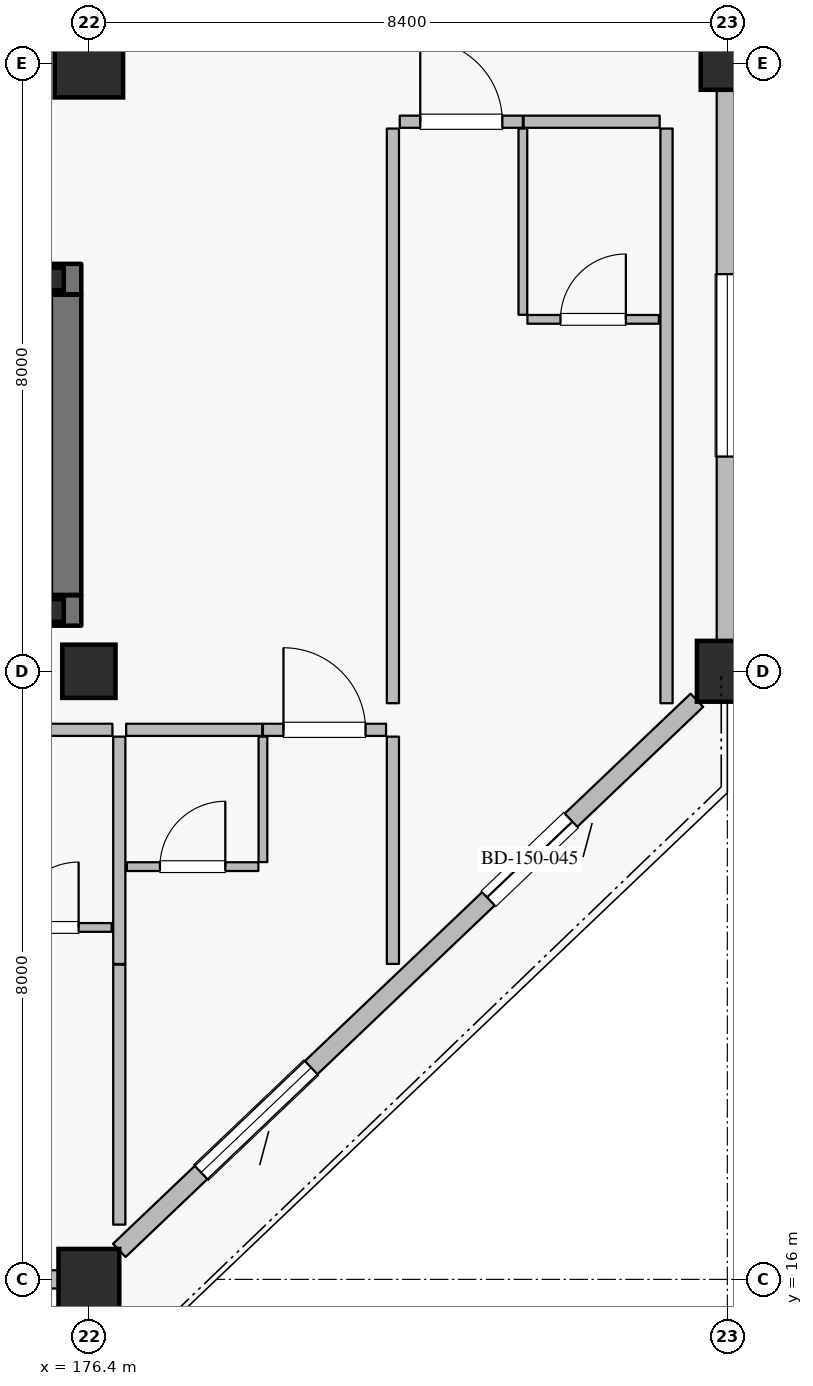
"""IFC4 building model, lengths in metres.
Left out: names, types, materials, properties, quantities, classifications, styles, units other than length and angle.
Written with IfcOpenShell. Run it as: python <this file> out.ifc"""

import sys

from ifc_helpers import new_model, si_unit, direction, frame, frame_2d, origin, origin_2d, place, context, subcontext, project, spatial, rectangle, hollow_rectangle, extrude, element, fill, save


model = new_model("IFC4")
c1 = context("Model", 3, precision=1e-05, world=origin(), true_north=direction((0.0, 1.0)))
c2 = subcontext(c1, "Body", "Model", "MODEL_VIEW")
j1 = project(units=[si_unit("LENGTHUNIT", "METRE"), si_unit("PLANEANGLEUNIT", "RADIAN")], contexts=[c1])
p1 = place(None, origin())
s1 = spatial("IfcSite", under=j1, at=p1, CompositionType="ELEMENT")
p2 = place(p1, origin())
s2 = spatial("IfcBuilding", under=s1, at=p2, CompositionType="ELEMENT")
p3 = place(p2, frame((0.0, 0.0, 25.2)))
s3 = spatial("IfcBuildingStorey", under=s2, at=p3, CompositionType="ELEMENT", Elevation=25.2)
p4 = place(p3, frame((176.4, 16.0, 0.0), z_axis=(0.0, 0.0, 1.0), x_axis=(1.0, 0.0, 0.0)))
e1 = element("IfcColumn", 1, at=p4, inside=s3, PredefinedType="COLUMN", context=c2, shape_type="SweptSolid", body=[
    extrude(rectangle(XDim=0.8, YDim=0.8, at=origin_2d()), origin(), (0.0, 0.0, 1.0), 3.6),
])
p5 = place(p3, frame((176.4, 32.0, 0.0), z_axis=(0.0, 0.0, 1.0), x_axis=(1.0, 0.0, 0.0)))
e2 = element("IfcColumn", 2, at=p5, inside=s3, PredefinedType="COLUMN", context=c2, shape_type="SweptSolid", body=[
    extrude(rectangle(XDim=0.9, YDim=0.9, at=origin_2d()), origin(), (0.0, 0.0, 1.0), 3.6),
])
p6 = place(p3, frame((184.8, 24.0, 0.0), z_axis=(0.0, 0.0, 1.0), x_axis=(1.0, 0.0, 0.0)))
e3 = element("IfcColumn", 3, at=p6, inside=s3, PredefinedType="COLUMN", context=c2, shape_type="SweptSolid", body=[
    extrude(rectangle(XDim=0.8, YDim=0.8, at=origin_2d()), origin(), (0.0, 0.0, 1.0), 3.6),
])
for number, where, z_axis, x_axis in (
    (4, (176.4, 24.0, 0.0), (0.0, 0.0, 1.0), (1.0, 0.0, 0.0)),
    (5, (184.8, 32.0, 0.0), (0.0, 0.0, 1.0), (1.0, 0.0, 0.0)),
):
    element("IfcColumn", number, at=place(p3, frame(where, z_axis=z_axis, x_axis=x_axis)), inside=s3, PredefinedType="COLUMN", context=c2, shape_type="SweptSolid", body=[
        extrude(rectangle(XDim=0.7, YDim=0.7, at=origin_2d()), origin(), (0.0, 0.0, 1.0), 3.6),
    ])
p7 = place(p3, frame((176.0, 16.0, 0.0), z_axis=(0.0, 0.0, 1.0), x_axis=(-1.0, 0.0, 0.0)))
e6 = element("IfcWall", 6, at=p7, inside=s3, PredefinedType="SOLIDWALL", context=c2, shape_type="SweptSolid", body=[
    extrude(rectangle(XDim=7.6, YDim=0.24, at=frame_2d((3.8, 0.0))), origin(), (0.0, 0.0, 1.0), 2.89),
])
p8 = place(p7, frame((0.6, 0.0, 0.0)))
e7 = element("IfcOpeningElement", 7, at=p8, cuts=e6, PredefinedType="OPENING", context=c2, shape_type="SweptSolid", body=[
    extrude(rectangle(XDim=1.5, YDim=2.25, at=frame_2d((0.75, 1.125))), frame((0.0, 0.13, 0.0), z_axis=(0.0, -1.0, 0.0), x_axis=(1.0, 0.0, 0.0)), (0.0, 0.0, 1.0), 0.26),
])
p9 = place(p7, frame((3.6, 0.0, 0.8)))
e8 = element("IfcOpeningElement", 8, at=p9, cuts=e6, PredefinedType="OPENING", context=c2, shape_type="SweptSolid", body=[
    extrude(rectangle(XDim=2.0, YDim=1.75, at=frame_2d((1.0, 0.875))), frame((0.0, 0.13, 0.0), z_axis=(0.0, -1.0, 0.0), x_axis=(1.0, 0.0, 0.0)), (0.0, 0.0, 1.0), 0.26),
])
p10 = place(p3, frame((184.4, 23.619, 0.0), z_axis=(0.0, 0.0, 1.0), x_axis=(-0.724145676014, -0.689647040094, 0.0)))
e9 = element("IfcWall", 9, at=p10, inside=s3, PredefinedType="SOLIDWALL", context=c2, shape_type="SweptSolid", body=[
    extrude(rectangle(XDim=10.495, YDim=0.24, at=frame_2d((5.248, 0.0))), origin(), (0.0, 0.0, 1.0), 2.89),
])
p11 = place(p10, frame((2.288, 0.0, 0.0)))
e10 = element("IfcOpeningElement", 10, at=p11, cuts=e9, PredefinedType="OPENING", context=c2, shape_type="SweptSolid", body=[
    extrude(rectangle(XDim=1.5, YDim=2.25, at=frame_2d((0.75, 1.125))), frame((0.0, 0.13, 0.0), z_axis=(0.0, -1.0, 0.0), x_axis=(1.0, 0.0, 0.0)), (0.0, 0.0, 1.0), 0.26),
])
p12 = place(p10, frame((7.009, 0.0, 0.8)))
e11 = element("IfcOpeningElement", 11, at=p12, cuts=e9, PredefinedType="OPENING", context=c2, shape_type="SweptSolid", body=[
    extrude(rectangle(XDim=2.0, YDim=1.75, at=frame_2d((1.0, 0.875))), frame((0.0, 0.13, 0.0), z_axis=(0.0, -1.0, 0.0), x_axis=(1.0, 0.0, 0.0)), (0.0, 0.0, 1.0), 0.26),
])
p13 = place(p3, frame((184.8, 31.65, 0.0), z_axis=(0.0, 0.0, 1.0), x_axis=(0.0, -1.0, 0.0)))
e12 = element("IfcWall", 12, at=p13, inside=s3, PredefinedType="SOLIDWALL", context=c2, shape_type="SweptSolid", body=[
    extrude(rectangle(XDim=7.25, YDim=0.28, at=frame_2d((3.625, 0.0))), origin(), (0.0, 0.0, 1.0), 2.7),
])
p14 = place(p13, frame((2.425, 0.0, 0.5)))
e13 = element("IfcOpeningElement", 13, at=p14, cuts=e12, PredefinedType="OPENING", context=c2, shape_type="SweptSolid", body=[
    extrude(rectangle(XDim=2.4, YDim=1.65, at=frame_2d((1.2, 0.825))), frame((0.0, 0.15, 0.0), z_axis=(0.0, -1.0, 0.0), x_axis=(1.0, 0.0, 0.0)), (0.0, 0.0, 1.0), 0.3),
])
p15 = place(p3, frame((168.1, 24.8, 0.0), z_axis=(0.0, 0.0, 1.0), x_axis=(1.0, 0.0, 0.0)))
e14 = element("IfcWall", 14, at=p15, inside=s3, PredefinedType="SHEAR", context=c2, shape_type="SweptSolid", body=[
    extrude(rectangle(XDim=8.2, YDim=0.4, at=frame_2d((4.1, 0.0))), origin(), (0.0, 0.0, 1.0), 3.335),
])
p16 = place(p3, frame((176.1, 25.005, 0.0), z_axis=(0.0, 0.0, 1.0), x_axis=(0.0, 1.0, 0.0)))
e15 = element("IfcWall", 15, at=p16, inside=s3, PredefinedType="SHEAR", context=c2, shape_type="SweptSolid", body=[
    extrude(rectangle(XDim=3.95, YDim=0.4, at=frame_2d((1.975, 0.0))), origin(), (0.0, 0.0, 1.0), 3.335),
])
p17 = place(p3, frame((168.1, 29.16, 0.0), z_axis=(0.0, 0.0, 1.0), x_axis=(1.0, 0.0, 0.0)))
e16 = element("IfcWall", 16, at=p17, inside=s3, PredefinedType="SHEAR", context=c2, shape_type="SweptSolid", body=[
    extrude(rectangle(XDim=8.2, YDim=0.4, at=frame_2d((4.1, 0.0))), origin(), (0.0, 0.0, 1.0), 3.335),
])
p18 = place(p17, frame((0.43, 0.0, 0.0)))
e17 = element("IfcOpeningElement", 17, at=p18, cuts=e16, PredefinedType="OPENING", context=c2, shape_type="SweptSolid", body=[
    extrude(rectangle(XDim=1.16, YDim=2.2, at=frame_2d((0.58, 1.1))), frame((0.0, 0.21, 0.0), z_axis=(0.0, -1.0, 0.0), x_axis=(1.0, 0.0, 0.0)), (0.0, 0.0, 1.0), 0.42),
])
for number, where, z_axis, x_axis in (
    (18, (175.92, 24.8, -2.1), (0.0, 0.0, 1.0), (1.0, 0.0, 0.0)),
    (19, (175.92, 29.16, -2.1), (0.0, 0.0, 1.0), (1.0, 0.0, 0.0)),
):
    element("IfcColumn", number, at=place(p3, frame(where, z_axis=z_axis, x_axis=x_axis)), inside=s3, PredefinedType="COLUMN", context=c2, shape_type="SweptSolid", body=[
        extrude(hollow_rectangle(XDim=0.3, YDim=0.3, WallThickness=0.012, at=origin_2d()), origin(), (0.0, 0.0, 1.0), 3.72),
    ])
p19 = place(p3, frame((174.92, 23.23, 0.0), z_axis=(0.0, 0.0, 1.0), x_axis=(1.0, 0.0, 0.0)))
e20 = element("IfcWall", 20, at=p19, inside=s3, PredefinedType="PARTITIONING", context=c2, shape_type="SweptSolid", body=[
    extrude(rectangle(XDim=1.79, YDim=0.16, at=frame_2d((0.895, 0.0))), origin(), (0.0, 0.0, 1.0), 3.335),
])
p20 = place(p3, frame((174.97, 20.63, 0.0), z_axis=(0.0, 0.0, 1.0), x_axis=(1.0, 0.0, 0.0)))
e21 = element("IfcWall", 21, at=p20, inside=s3, PredefinedType="PARTITIONING", context=c2, shape_type="SweptSolid", body=[
    extrude(rectangle(XDim=1.73, YDim=0.115, at=frame_2d((0.865, 0.0))), origin(), (0.0, 0.0, 1.0), 3.335),
])
p21 = place(p20, frame((0.435, 0.0, 0.0)))
e22 = element("IfcOpeningElement", 22, at=p21, cuts=e21, PredefinedType="OPENING", context=c2, shape_type="SweptSolid", body=[
    extrude(rectangle(XDim=0.86, YDim=2.12, at=frame_2d((0.43, 1.06))), frame((0.0, 0.067, 0.0), z_axis=(0.0, -1.0, 0.0), x_axis=(1.0, 0.0, 0.0)), (0.0, 0.0, 1.0), 0.135),
])
p22 = place(p3, frame((176.8, 16.72, 0.0), z_axis=(0.0, 0.0, 1.0), x_axis=(0.0, 1.0, 0.0)))
e23 = element("IfcWall", 23, at=p22, inside=s3, PredefinedType="PARTITIONING", context=c2, shape_type="SweptSolid", body=[
    extrude(rectangle(XDim=3.42, YDim=0.16, at=frame_2d((1.71, 0.0))), origin(), (0.0, 0.0, 1.0), 3.335),
])
p23 = place(p3, frame((176.89, 23.23, 0.0), z_axis=(0.0, 0.0, 1.0), x_axis=(1.0, 0.0, 0.0)))
e24 = element("IfcWall", 24, at=p23, inside=s3, PredefinedType="PARTITIONING", context=c2, shape_type="SweptSolid", body=[
    extrude(rectangle(XDim=1.79, YDim=0.16, at=frame_2d((0.895, 0.0))), origin(), (0.0, 0.0, 1.0), 3.335),
])
p24 = place(p3, frame((178.69, 23.23, 0.0), z_axis=(0.0, 0.0, 1.0), x_axis=(1.0, 0.0, 0.0)))
e25 = element("IfcWall", 25, at=p24, inside=s3, PredefinedType="PARTITIONING", context=c2, shape_type="SweptSolid", body=[
    extrude(rectangle(XDim=1.62, YDim=0.16, at=frame_2d((0.81, 0.0))), origin(), (0.0, 0.0, 1.0), 3.335),
])
p25 = place(p24, frame((0.27, 0.0, 0.0)))
e26 = element("IfcOpeningElement", 26, at=p25, cuts=e25, PredefinedType="OPENING", context=c2, shape_type="SweptSolid", body=[
    extrude(rectangle(XDim=1.08, YDim=2.3, at=frame_2d((0.54, 1.15))), frame((0.0, 0.09, 0.0), z_axis=(0.0, -1.0, 0.0), x_axis=(1.0, 0.0, 0.0)), (0.0, 0.0, 1.0), 0.18),
])
p26 = place(p3, frame((178.69, 21.49, 0.0), z_axis=(0.0, 0.0, 1.0), x_axis=(0.0, 1.0, 0.0)))
e27 = element("IfcWall", 27, at=p26, inside=s3, PredefinedType="PARTITIONING", context=c2, shape_type="SweptSolid", body=[
    extrude(rectangle(XDim=1.65, YDim=0.115, at=frame_2d((0.825, 0.0))), origin(), (0.0, 0.0, 1.0), 3.335),
])
p27 = place(p3, frame((176.9, 21.43, 0.0), z_axis=(0.0, 0.0, 1.0), x_axis=(1.0, 0.0, 0.0)))
e28 = element("IfcWall", 28, at=p27, inside=s3, PredefinedType="PARTITIONING", context=c2, shape_type="SweptSolid", body=[
    extrude(rectangle(XDim=1.73, YDim=0.115, at=frame_2d((0.865, 0.0))), origin(), (0.0, 0.0, 1.0), 3.335),
])
p28 = place(p27, frame((0.435, 0.0, 0.0)))
e29 = element("IfcOpeningElement", 29, at=p28, cuts=e28, PredefinedType="OPENING", context=c2, shape_type="SweptSolid", body=[
    extrude(rectangle(XDim=0.86, YDim=2.12, at=frame_2d((0.43, 1.06))), frame((0.0, 0.067, 0.0), z_axis=(0.0, -1.0, 0.0), x_axis=(1.0, 0.0, 0.0)), (0.0, 0.0, 1.0), 0.135),
])
for number, where, z_axis, x_axis in (
    (30, (176.8, 20.15, 0.0), (0.0, 0.0, 1.0), (0.0, 1.0, 0.0)),
    (31, (180.4, 20.15, 0.0), (0.0, 0.0, 1.0), (0.0, 1.0, 0.0)),
):
    element("IfcWall", number, at=place(p3, frame(where, z_axis=z_axis, x_axis=x_axis)), inside=s3, PredefinedType="PARTITIONING", context=c2, shape_type="SweptSolid", body=[
        extrude(rectangle(XDim=2.99, YDim=0.16, at=frame_2d((1.495, 0.0))), origin(), (0.0, 0.0, 1.0), 3.335),
    ])
p29 = place(p3, frame((180.49, 31.23, 0.0), z_axis=(0.0, 0.0, 1.0), x_axis=(1.0, 0.0, 0.0)))
e32 = element("IfcWall", 32, at=p29, inside=s3, PredefinedType="PARTITIONING", context=c2, shape_type="SweptSolid", body=[
    extrude(rectangle(XDim=1.62, YDim=0.16, at=frame_2d((0.81, 0.0))), origin(), (0.0, 0.0, 1.0), 3.335),
])
p30 = place(p29, frame((0.27, 0.0, 0.0)))
e33 = element("IfcOpeningElement", 33, at=p30, cuts=e32, PredefinedType="OPENING", context=c2, shape_type="SweptSolid", body=[
    extrude(rectangle(XDim=1.08, YDim=2.3, at=frame_2d((0.54, 1.15))), frame((0.0, 0.09, 0.0), z_axis=(0.0, -1.0, 0.0), x_axis=(1.0, 0.0, 0.0)), (0.0, 0.0, 1.0), 0.18),
])
p31 = place(p3, frame((182.12, 31.23, 0.0), z_axis=(0.0, 0.0, 1.0), x_axis=(1.0, 0.0, 0.0)))
e34 = element("IfcWall", 34, at=p31, inside=s3, PredefinedType="PARTITIONING", context=c2, shape_type="SweptSolid", body=[
    extrude(rectangle(XDim=1.79, YDim=0.16, at=frame_2d((0.895, 0.0))), origin(), (0.0, 0.0, 1.0), 3.335),
])
p32 = place(p3, frame((182.11, 28.69, 0.0), z_axis=(0.0, 0.0, 1.0), x_axis=(0.0, 1.0, 0.0)))
e35 = element("IfcWall", 35, at=p32, inside=s3, PredefinedType="PARTITIONING", context=c2, shape_type="SweptSolid", body=[
    extrude(rectangle(XDim=2.45, YDim=0.115, at=frame_2d((1.225, 0.0))), origin(), (0.0, 0.0, 1.0), 3.335),
])
p33 = place(p3, frame((182.17, 28.63, 0.0), z_axis=(0.0, 0.0, 1.0), x_axis=(1.0, 0.0, 0.0)))
e36 = element("IfcWall", 36, at=p33, inside=s3, PredefinedType="PARTITIONING", context=c2, shape_type="SweptSolid", body=[
    extrude(rectangle(XDim=1.73, YDim=0.115, at=frame_2d((0.865, 0.0))), origin(), (0.0, 0.0, 1.0), 3.335),
])
p34 = place(p33, frame((0.435, 0.0, 0.0)))
e37 = element("IfcOpeningElement", 37, at=p34, cuts=e36, PredefinedType="OPENING", context=c2, shape_type="SweptSolid", body=[
    extrude(rectangle(XDim=0.86, YDim=2.12, at=frame_2d((0.43, 1.06))), frame((0.0, 0.067, 0.0), z_axis=(0.0, -1.0, 0.0), x_axis=(1.0, 0.0, 0.0)), (0.0, 0.0, 1.0), 0.135),
])
for number, where, z_axis, x_axis in (
    (38, (180.4, 23.58, 0.0), (0.0, 0.0, 1.0), (0.0, 1.0, 0.0)),
    (39, (184.0, 23.58, 0.0), (0.0, 0.0, 1.0), (0.0, 1.0, 0.0)),
):
    element("IfcWall", number, at=place(p3, frame(where, z_axis=z_axis, x_axis=x_axis)), inside=s3, PredefinedType="PARTITIONING", context=c2, shape_type="SweptSolid", body=[
        extrude(rectangle(XDim=7.56, YDim=0.16, at=frame_2d((3.78, 0.0))), origin(), (0.0, 0.0, 1.0), 3.335),
    ])
p35 = place(p11, origin())
e40 = element("IfcDoor", 40, at=p35, inside=s3, OperationType="SLIDING_TO_LEFT", PredefinedType="DOOR", context=c2, shape_type="SweptSolid", body=[
    extrude(rectangle(XDim=1.5, YDim=2.25, at=frame_2d((0.75, 1.125))), frame((0.0, 0.025, 0.0), z_axis=(0.0, -1.0, 0.0), x_axis=(1.0, 0.0, 0.0)), (0.0, 0.0, 1.0), 0.05),
])
fill(e10, e40)
p36 = place(p12, origin())
e41 = element("IfcWindow", 41, at=p36, inside=s3, PartitioningType="DOUBLE_PANEL_VERTICAL", PredefinedType="WINDOW", context=c2, shape_type="SweptSolid", body=[
    extrude(rectangle(XDim=2.0, YDim=1.75, at=frame_2d((1.0, 0.875))), frame((0.0, 0.03, 0.0), z_axis=(0.0, -1.0, 0.0), x_axis=(1.0, 0.0, 0.0)), (0.0, 0.0, 1.0), 0.06),
])
fill(e11, e41)
p37 = place(p14, origin())
e42 = element("IfcWindow", 42, at=p37, inside=s3, PartitioningType="DOUBLE_PANEL_VERTICAL", PredefinedType="WINDOW", context=c2, shape_type="SweptSolid", body=[
    extrude(rectangle(XDim=2.4, YDim=1.65, at=frame_2d((1.2, 0.825))), frame((0.0, 0.03, 0.0), z_axis=(0.0, -1.0, 0.0), x_axis=(1.0, 0.0, 0.0)), (0.0, 0.0, 1.0), 0.06),
])
fill(e13, e42)
p38 = place(p21, origin())
e43 = element("IfcDoor", 43, at=p38, inside=s3, OperationType="SINGLE_SWING_RIGHT", PredefinedType="DOOR", context=c2, shape_type="SweptSolid", body=[
    extrude(rectangle(XDim=0.86, YDim=2.12, at=frame_2d((0.43, 1.06))), frame((0.0, 0.025, 0.0), z_axis=(0.0, -1.0, 0.0), x_axis=(1.0, 0.0, 0.0)), (0.0, 0.0, 1.0), 0.05),
])
fill(e22, e43)
p39 = place(p25, origin())
e44 = element("IfcDoor", 44, at=p39, inside=s3, OperationType="SINGLE_SWING_LEFT", PredefinedType="DOOR", context=c2, shape_type="SweptSolid", body=[
    extrude(rectangle(XDim=1.08, YDim=2.3, at=frame_2d((0.54, 1.15))), frame((0.0, 0.025, 0.0), z_axis=(0.0, -1.0, 0.0), x_axis=(1.0, 0.0, 0.0)), (0.0, 0.0, 1.0), 0.05),
])
fill(e26, e44)
p40 = place(p28, origin())
e45 = element("IfcDoor", 45, at=p40, inside=s3, OperationType="SINGLE_SWING_RIGHT", PredefinedType="DOOR", context=c2, shape_type="SweptSolid", body=[
    extrude(rectangle(XDim=0.86, YDim=2.12, at=frame_2d((0.43, 1.06))), frame((0.0, 0.025, 0.0), z_axis=(0.0, -1.0, 0.0), x_axis=(1.0, 0.0, 0.0)), (0.0, 0.0, 1.0), 0.05),
])
fill(e29, e45)
p41 = place(p30, origin())
e46 = element("IfcDoor", 46, at=p41, inside=s3, OperationType="SINGLE_SWING_LEFT", PredefinedType="DOOR", context=c2, shape_type="SweptSolid", body=[
    extrude(rectangle(XDim=1.08, YDim=2.3, at=frame_2d((0.54, 1.15))), frame((0.0, 0.025, 0.0), z_axis=(0.0, -1.0, 0.0), x_axis=(1.0, 0.0, 0.0)), (0.0, 0.0, 1.0), 0.05),
])
fill(e33, e46)
p42 = place(p34, origin())
e47 = element("IfcDoor", 47, at=p42, inside=s3, OperationType="SINGLE_SWING_RIGHT", PredefinedType="DOOR", context=c2, shape_type="SweptSolid", body=[
    extrude(rectangle(XDim=0.86, YDim=2.12, at=frame_2d((0.43, 1.06))), frame((0.0, 0.025, 0.0), z_axis=(0.0, -1.0, 0.0), x_axis=(1.0, 0.0, 0.0)), (0.0, 0.0, 1.0), 0.05),
])
fill(e37, e47)
save(model, sys.argv[1])
